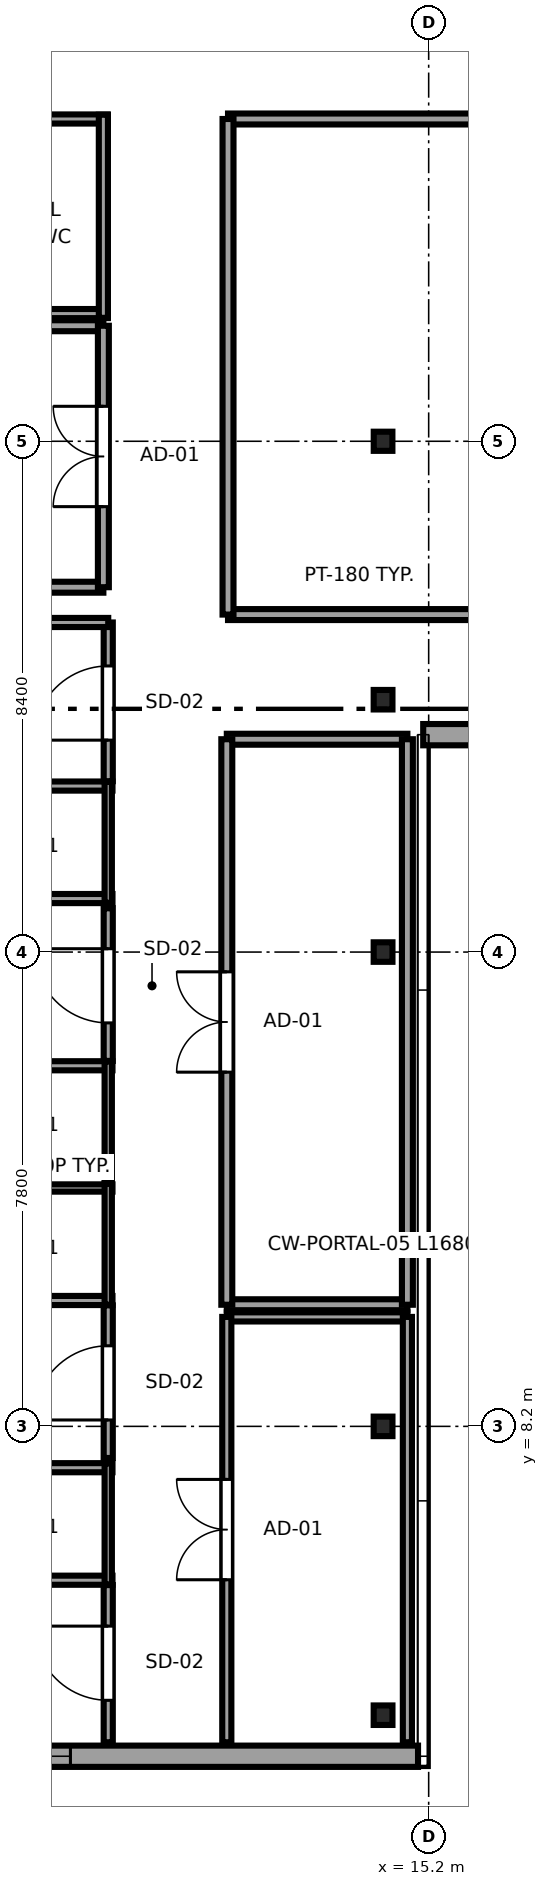
"""IFC4 building model, lengths in metres.
Left out: names, types, materials, properties, quantities, classifications, styles, units other than length and angle.
Written with IfcOpenShell. Run it as: python <this file> out.ifc"""

import sys

from ifc_helpers import new_model, si_unit, direction, frame, frame_2d, origin, origin_2d, place, context, subcontext, project, spatial, rectangle, i_section, extrude, source, transform, mapped, element, fill, save


model = new_model("IFC4")
c1 = context("Model", 3, precision=1e-05, world=origin(), true_north=direction((0.0, 1.0)))
c2 = subcontext(c1, "Body", "Model", "MODEL_VIEW")
j1 = project(units=[si_unit("LENGTHUNIT", "METRE"), si_unit("PLANEANGLEUNIT", "RADIAN")], contexts=[c1])
p1 = place(None, origin())
s1 = spatial("IfcSite", under=j1, at=p1, CompositionType="ELEMENT")
p2 = place(p1, origin())
s2 = spatial("IfcBuilding", under=s1, at=p2, CompositionType="ELEMENT")
p3 = place(p2, frame((0.0, 0.0, 245.2)))
s3 = spatial("IfcBuildingStorey", under=s2, at=p3, CompositionType="ELEMENT", Elevation=245.2)
m1 = source(origin(), c2, "Body", "SweptSolid", [
    extrude(i_section(OverallWidth=0.309, OverallDepth=0.321, WebThickness=0.014, FlangeThickness=0.022, FilletRadius=0.017, at=origin_2d()), origin(), (0.0, 0.0, 1.0), 3.55),
])
for number, where, z_axis, x_axis in (
    (1, (14.45, 3.45, 0.0), (0.0, 0.0, 1.0), (1.0, 0.0, 0.0)),
    (2, (14.45, 8.2, 0.0), (0.0, 0.0, 1.0), (1.0, 0.0, 0.0)),
    (3, (14.45, 16.0, 0.0), (0.0, 0.0, 1.0), (1.0, 0.0, 0.0)),
):
    element("IfcColumn", number, at=place(p3, frame(where, z_axis=z_axis, x_axis=x_axis)), inside=s3, PredefinedType="COLUMN", context=c2, shape_type="MappedRepresentation", body=[
        mapped(m1, transform((0.0, 0.0, 0.0), x_axis=(1.0, 0.0, 0.0), y_axis=(0.0, 1.0, 0.0), z_axis=(0.0, 0.0, 1.0), scale=1.0)),
    ])
m2 = source(origin(), c2, "Body", "SweptSolid", [
    extrude(i_section(OverallWidth=0.307, OverallDepth=0.315, WebThickness=0.012, FlangeThickness=0.019, FilletRadius=0.017, at=origin_2d()), origin(), (0.0, 0.0, 1.0), 3.55),
])
p4 = place(p3, frame((14.45, 24.4, 0.0), z_axis=(0.0, 0.0, 1.0), x_axis=(1.0, 0.0, 0.0)))
e4 = element("IfcColumn", 4, at=p4, inside=s3, PredefinedType="COLUMN", context=c2, shape_type="MappedRepresentation", body=[
    mapped(m2, transform((0.0, 0.0, 0.0), x_axis=(1.0, 0.0, 0.0), y_axis=(0.0, 1.0, 0.0), z_axis=(0.0, 0.0, 1.0), scale=1.0)),
])
p5 = place(p3, frame((14.45, 20.15, 0.0), z_axis=(0.0, 0.0, 1.0), x_axis=(1.0, 0.0, 0.0)))
e5 = element("IfcColumn", 5, at=p5, inside=s3, PredefinedType="COLUMN", context=c2, shape_type="MappedRepresentation", body=[
    mapped(m1, transform((0.0, 0.0, 0.0), x_axis=(1.0, 0.0, 0.0), y_axis=(0.0, 1.0, 0.0), z_axis=(0.0, 0.0, 1.0), scale=1.0)),
])
p6 = place(p3, frame((7.017, 2.775, 0.0), z_axis=(0.0, 0.0, 1.0), x_axis=(1.0, 0.0, 0.0)))
e6 = element("IfcWall", 6, at=p6, inside=s3, PredefinedType="SOLIDWALL", context=c2, shape_type="SweptSolid", body=[
    extrude(rectangle(XDim=8.008, YDim=0.35, at=frame_2d((4.004, 0.0))), origin(), (0.0, 0.0, 1.0), 3.37),
])
p7 = place(p6, frame((0.791, 0.0, 0.62)))
e7 = element("IfcOpeningElement", 7, at=p7, cuts=e6, PredefinedType="OPENING", context=c2, shape_type="SweptSolid", body=[
    extrude(rectangle(XDim=1.5, YDim=1.55, at=frame_2d((0.75, 0.775))), frame((0.0, 0.185, 0.0), z_axis=(0.0, -1.0, 0.0), x_axis=(1.0, 0.0, 0.0)), (0.0, 0.0, 1.0), 0.37),
])
p8 = place(p3, frame((15.11, 19.575, 0.0), z_axis=(0.0, 0.0, 1.0), x_axis=(1.0, 0.0, 0.0)))
e8 = element("IfcWall", 8, at=p8, inside=s3, PredefinedType="SOLIDWALL", context=c2, shape_type="SweptSolid", body=[
    extrude(rectangle(XDim=16.98, YDim=0.35, at=frame_2d((8.49, 0.0))), origin(), (0.0, 0.0, 1.0), 3.37),
])
p9 = place(p8, frame((1.88, 0.0, 0.68)))
e9 = element("IfcOpeningElement", 9, at=p9, cuts=e8, PredefinedType="OPENING", context=c2, shape_type="SweptSolid", body=[
    extrude(rectangle(XDim=2.7, YDim=1.95, at=frame_2d((1.35, 0.975))), frame((0.0, 0.185, 0.0), z_axis=(0.0, -1.0, 0.0), x_axis=(1.0, 0.0, 0.0)), (0.0, 0.0, 1.0), 0.37),
])
p10 = place(p8, frame((7.14, 0.0, 0.68)))
e10 = element("IfcOpeningElement", 10, at=p10, cuts=e8, PredefinedType="OPENING", context=c2, shape_type="SweptSolid", body=[
    extrude(rectangle(XDim=2.7, YDim=1.95, at=frame_2d((1.35, 0.975))), frame((0.0, 0.185, 0.0), z_axis=(0.0, -1.0, 0.0), x_axis=(1.0, 0.0, 0.0)), (0.0, 0.0, 1.0), 0.37),
])
p11 = place(p8, frame((12.4, 0.0, 0.68)))
e11 = element("IfcOpeningElement", 11, at=p11, cuts=e8, PredefinedType="OPENING", context=c2, shape_type="SweptSolid", body=[
    extrude(rectangle(XDim=2.7, YDim=1.95, at=frame_2d((1.35, 0.975))), frame((0.0, 0.185, 0.0), z_axis=(0.0, -1.0, 0.0), x_axis=(1.0, 0.0, 0.0)), (0.0, 0.0, 1.0), 0.37),
])
for number, where, z_axis, x_axis in (
    (12, (7.41, 5.67, 0.0), (0.0, 0.0, 1.0), (1.0, 0.0, 0.0)),
    (13, (7.41, 7.52, 0.0), (0.0, 0.0, 1.0), (1.0, 0.0, 0.0)),
):
    element("IfcWall", number, at=place(p3, frame(where, z_axis=z_axis, x_axis=x_axis)), inside=s3, PredefinedType="PARTITIONING", context=c2, shape_type="SweptSolid", body=[
        extrude(rectangle(XDim=2.59, YDim=0.15, at=frame_2d((1.295, 0.0))), origin(), (0.0, 0.0, 1.0), 3.37),
    ])
p12 = place(p3, frame((9.93, 5.6, 0.0), z_axis=(0.0, 0.0, 1.0), x_axis=(0.0, 1.0, 0.0)))
e14 = element("IfcWall", 14, at=p12, inside=s3, PredefinedType="PLUMBINGWALL", context=c2, shape_type="SweptSolid", body=[
    extrude(rectangle(XDim=1.99, YDim=0.12, at=frame_2d((0.995, 0.0))), origin(), (0.0, 0.0, 1.0), 3.37),
])
p13 = place(p3, frame((7.41, 10.27, 0.0), z_axis=(0.0, 0.0, 1.0), x_axis=(1.0, 0.0, 0.0)))
e15 = element("IfcWall", 15, at=p13, inside=s3, PredefinedType="PARTITIONING", context=c2, shape_type="SweptSolid", body=[
    extrude(rectangle(XDim=2.59, YDim=0.15, at=frame_2d((1.295, 0.0))), origin(), (0.0, 0.0, 1.0), 3.37),
])
p14 = place(p3, frame((7.41, 12.12, 0.0), z_axis=(0.0, 0.0, 1.0), x_axis=(1.0, 0.0, 0.0)))
e16 = element("IfcWall", 16, at=p14, inside=s3, PredefinedType="PLUMBINGWALL", context=c2, shape_type="SweptSolid", body=[
    extrude(rectangle(XDim=2.59, YDim=0.12, at=frame_2d((1.295, 0.0))), origin(), (0.0, 0.0, 1.0), 3.37),
])
p15 = place(p3, frame((9.93, 10.2, 0.0), z_axis=(0.0, 0.0, 1.0), x_axis=(0.0, 1.0, 0.0)))
e17 = element("IfcWall", 17, at=p15, inside=s3, PredefinedType="PLUMBINGWALL", context=c2, shape_type="SweptSolid", body=[
    extrude(rectangle(XDim=1.99, YDim=0.12, at=frame_2d((0.995, 0.0))), origin(), (0.0, 0.0, 1.0), 3.37),
])
p16 = place(p3, frame((7.41, 14.13, 0.0), z_axis=(0.0, 0.0, 1.0), x_axis=(1.0, 0.0, 0.0)))
e18 = element("IfcWall", 18, at=p16, inside=s3, PredefinedType="PARTITIONING", context=c2, shape_type="SweptSolid", body=[
    extrude(rectangle(XDim=2.59, YDim=0.15, at=frame_2d((1.295, 0.0))), origin(), (0.0, 0.0, 1.0), 3.37),
])
p17 = place(p3, frame((9.93, 12.21, 0.0), z_axis=(0.0, 0.0, 1.0), x_axis=(0.0, 1.0, 0.0)))
e19 = element("IfcWall", 19, at=p17, inside=s3, PredefinedType="PLUMBINGWALL", context=c2, shape_type="SweptSolid", body=[
    extrude(rectangle(XDim=1.99, YDim=0.12, at=frame_2d((0.995, 0.0))), origin(), (0.0, 0.0, 1.0), 3.37),
])
p18 = place(p3, frame((3.005, 16.88, 0.0), z_axis=(0.0, 0.0, 1.0), x_axis=(1.0, 0.0, 0.0)))
e20 = element("IfcWall", 20, at=p18, inside=s3, PredefinedType="PARTITIONING", context=c2, shape_type="SweptSolid", body=[
    extrude(rectangle(XDim=6.995, YDim=0.15, at=frame_2d((3.498, 0.0))), origin(), (0.0, 0.0, 1.0), 3.37),
])
p19 = place(p3, frame((7.41, 18.73, 0.0), z_axis=(0.0, 0.0, 1.0), x_axis=(1.0, 0.0, 0.0)))
e21 = element("IfcWall", 21, at=p19, inside=s3, PredefinedType="PARTITIONING", context=c2, shape_type="SweptSolid", body=[
    extrude(rectangle(XDim=2.59, YDim=0.15, at=frame_2d((1.295, 0.0))), origin(), (0.0, 0.0, 1.0), 3.37),
])
p20 = place(p3, frame((9.93, 16.81, 0.0), z_axis=(0.0, 0.0, 1.0), x_axis=(0.0, 1.0, 0.0)))
e22 = element("IfcWall", 22, at=p20, inside=s3, PredefinedType="PLUMBINGWALL", context=c2, shape_type="SweptSolid", body=[
    extrude(rectangle(XDim=1.99, YDim=0.12, at=frame_2d((0.995, 0.0))), origin(), (0.0, 0.0, 1.0), 3.37),
])
p21 = place(p3, frame((9.93, 3.005, 0.0), z_axis=(0.0, 0.0, 1.0), x_axis=(0.0, 1.0, 0.0)))
e23 = element("IfcWall", 23, at=p21, inside=s3, PredefinedType="PARTITIONING", context=c2, shape_type="SweptSolid", body=[
    extrude(rectangle(XDim=2.585, YDim=0.15, at=frame_2d((1.292, 0.0))), origin(), (0.0, 0.0, 1.0), 3.37),
])
p22 = place(p21, frame((0.69, 0.0, 0.0)))
e24 = element("IfcOpeningElement", 24, at=p22, cuts=e23, PredefinedType="OPENING", context=c2, shape_type="SweptSolid", body=[
    extrude(rectangle(XDim=1.22, YDim=2.08, at=frame_2d((0.61, 1.04))), frame((0.0, 0.085, 0.0), z_axis=(0.0, -1.0, 0.0), x_axis=(1.0, 0.0, 0.0)), (0.0, 0.0, 1.0), 0.17),
])
p23 = place(p3, frame((9.93, 7.68, 0.0), z_axis=(0.0, 0.0, 1.0), x_axis=(0.0, 1.0, 0.0)))
e25 = element("IfcWall", 25, at=p23, inside=s3, PredefinedType="PARTITIONING", context=c2, shape_type="SweptSolid", body=[
    extrude(rectangle(XDim=2.51, YDim=0.15, at=frame_2d((1.255, 0.0))), origin(), (0.0, 0.0, 1.0), 3.37),
])
p24 = place(p23, frame((0.625, 0.0, 0.0)))
e26 = element("IfcOpeningElement", 26, at=p24, cuts=e25, PredefinedType="OPENING", context=c2, shape_type="SweptSolid", body=[
    extrude(rectangle(XDim=1.22, YDim=2.08, at=frame_2d((0.61, 1.04))), frame((0.0, 0.085, 0.0), z_axis=(0.0, -1.0, 0.0), x_axis=(1.0, 0.0, 0.0)), (0.0, 0.0, 1.0), 0.17),
])
p25 = place(p3, frame((9.93, 14.21, 0.0), z_axis=(0.0, 0.0, 1.0), x_axis=(0.0, 1.0, 0.0)))
e27 = element("IfcWall", 27, at=p25, inside=s3, PredefinedType="PARTITIONING", context=c2, shape_type="SweptSolid", body=[
    extrude(rectangle(XDim=2.51, YDim=0.15, at=frame_2d((1.255, 0.0))), origin(), (0.0, 0.0, 1.0), 3.37),
])
p26 = place(p25, frame((0.625, 0.0, 0.0)))
e28 = element("IfcOpeningElement", 28, at=p26, cuts=e27, PredefinedType="OPENING", context=c2, shape_type="SweptSolid", body=[
    extrude(rectangle(XDim=1.22, YDim=2.08, at=frame_2d((0.61, 1.04))), frame((0.0, 0.085, 0.0), z_axis=(0.0, -1.0, 0.0), x_axis=(1.0, 0.0, 0.0)), (0.0, 0.0, 1.0), 0.17),
])
p27 = place(p3, frame((9.93, 18.81, 0.0), z_axis=(0.0, 0.0, 1.0), x_axis=(0.0, 1.0, 0.0)))
e29 = element("IfcWall", 29, at=p27, inside=s3, PredefinedType="PARTITIONING", context=c2, shape_type="SweptSolid", body=[
    extrude(rectangle(XDim=2.61, YDim=0.15, at=frame_2d((1.305, 0.0))), origin(), (0.0, 0.0, 1.0), 3.37),
])
p28 = place(p27, frame((0.675, 0.0, 0.0)))
e30 = element("IfcOpeningElement", 30, at=p28, cuts=e29, PredefinedType="OPENING", context=c2, shape_type="SweptSolid", body=[
    extrude(rectangle(XDim=1.22, YDim=2.08, at=frame_2d((0.61, 1.04))), frame((0.0, 0.085, 0.0), z_axis=(0.0, -1.0, 0.0), x_axis=(1.0, 0.0, 0.0)), (0.0, 0.0, 1.0), 0.17),
])
p29 = place(p3, frame((3.005, 21.42, 0.0), z_axis=(0.0, 0.0, 1.0), x_axis=(1.0, 0.0, 0.0)))
e31 = element("IfcWall", 31, at=p29, inside=s3, PredefinedType="PARTITIONING", context=c2, shape_type="SweptSolid", body=[
    extrude(rectangle(XDim=6.925, YDim=0.15, at=frame_2d((3.462, 0.0))), origin(), (0.0, 0.0, 1.0), 3.37),
])
for number, where, z_axis, x_axis in (
    (32, (11.88, 10.2, 0.0), (0.0, 0.0, 1.0), (1.0, 0.0, 0.0)),
    (33, (11.88, 19.5, 0.0), (0.0, 0.0, 1.0), (1.0, 0.0, 0.0)),
):
    element("IfcWall", number, at=place(p3, frame(where, z_axis=z_axis, x_axis=x_axis)), inside=s3, PredefinedType="PARTITIONING", context=c2, shape_type="SweptSolid", body=[
        extrude(rectangle(XDim=2.97, YDim=0.18, at=frame_2d((1.485, 0.0))), origin(), (0.0, 0.0, 1.0), 3.37),
    ])
p30 = place(p3, frame((11.88, 10.2, 0.0), z_axis=(0.0, 0.0, 1.0), x_axis=(0.0, 1.0, 0.0)))
e34 = element("IfcWall", 34, at=p30, inside=s3, PredefinedType="PARTITIONING", context=c2, shape_type="SweptSolid", body=[
    extrude(rectangle(XDim=9.3, YDim=0.18, at=frame_2d((4.65, 0.0))), origin(), (0.0, 0.0, 1.0), 3.37),
])
p31 = place(p30, frame((3.825, 0.0, 0.0)))
e35 = element("IfcOpeningElement", 35, at=p31, cuts=e34, PredefinedType="OPENING", context=c2, shape_type="SweptSolid", body=[
    extrude(rectangle(XDim=1.65, YDim=2.15, at=frame_2d((0.825, 1.075))), frame((0.0, 0.1, 0.0), z_axis=(0.0, -1.0, 0.0), x_axis=(1.0, 0.0, 0.0)), (0.0, 0.0, 1.0), 0.2),
])
p32 = place(p3, frame((14.85, 10.2, 0.0), z_axis=(0.0, 0.0, 1.0), x_axis=(0.0, 1.0, 0.0)))
e36 = element("IfcWall", 36, at=p32, inside=s3, PredefinedType="PARTITIONING", context=c2, shape_type="SweptSolid", body=[
    extrude(rectangle(XDim=9.3, YDim=0.18, at=frame_2d((4.65, 0.0))), origin(), (0.0, 0.0, 1.0), 3.37),
])
p33 = place(p3, frame((11.88, 10.0, 0.0), z_axis=(0.0, 0.0, 1.0), x_axis=(1.0, 0.0, 0.0)))
e37 = element("IfcWall", 37, at=p33, inside=s3, PredefinedType="PARTITIONING", context=c2, shape_type="SweptSolid", body=[
    extrude(rectangle(XDim=2.97, YDim=0.15, at=frame_2d((1.485, 0.0))), origin(), (0.0, 0.0, 1.0), 3.37),
])
p34 = place(p3, frame((11.88, 3.005, 0.0), z_axis=(0.0, 0.0, 1.0), x_axis=(0.0, 1.0, 0.0)))
e38 = element("IfcWall", 38, at=p34, inside=s3, PredefinedType="PARTITIONING", context=c2, shape_type="SweptSolid", body=[
    extrude(rectangle(XDim=6.995, YDim=0.15, at=frame_2d((3.498, 0.0))), origin(), (0.0, 0.0, 1.0), 3.37),
])
p35 = place(p34, frame((2.673, 0.0, 0.0)))
e39 = element("IfcOpeningElement", 39, at=p35, cuts=e38, PredefinedType="OPENING", context=c2, shape_type="SweptSolid", body=[
    extrude(rectangle(XDim=1.65, YDim=2.15, at=frame_2d((0.825, 1.075))), frame((0.0, 0.085, 0.0), z_axis=(0.0, -1.0, 0.0), x_axis=(1.0, 0.0, 0.0)), (0.0, 0.0, 1.0), 0.17),
])
p36 = place(p3, frame((14.85, 3.005, 0.0), z_axis=(0.0, 0.0, 1.0), x_axis=(0.0, 1.0, 0.0)))
e40 = element("IfcWall", 40, at=p36, inside=s3, PredefinedType="PARTITIONING", context=c2, shape_type="SweptSolid", body=[
    extrude(rectangle(XDim=6.995, YDim=0.15, at=frame_2d((3.498, 0.0))), origin(), (0.0, 0.0, 1.0), 3.37),
])
p37 = place(p3, frame((11.9, 21.55, 0.0), z_axis=(0.0, 0.0, 1.0), x_axis=(1.0, 0.0, 0.0)))
e41 = element("IfcWall", 41, at=p37, inside=s3, PredefinedType="PARTITIONING", context=c2, shape_type="SweptSolid", body=[
    extrude(rectangle(XDim=10.3, YDim=0.18, at=frame_2d((5.15, 0.0))), origin(), (0.0, 0.0, 1.0), 3.37),
])
p38 = place(p37, frame((4.325, 0.0, 0.0)))
e42 = element("IfcOpeningElement", 42, at=p38, cuts=e41, PredefinedType="OPENING", context=c2, shape_type="SweptSolid", body=[
    extrude(rectangle(XDim=1.65, YDim=2.15, at=frame_2d((0.825, 1.075))), frame((0.0, 0.1, 0.0), z_axis=(0.0, -1.0, 0.0), x_axis=(1.0, 0.0, 0.0)), (0.0, 0.0, 1.0), 0.2),
])
p39 = place(p3, frame((11.9, 29.7, 0.0), z_axis=(0.0, 0.0, 1.0), x_axis=(1.0, 0.0, 0.0)))
e43 = element("IfcWall", 43, at=p39, inside=s3, PredefinedType="PARTITIONING", context=c2, shape_type="SweptSolid", body=[
    extrude(rectangle(XDim=10.3, YDim=0.18, at=frame_2d((5.15, 0.0))), origin(), (0.0, 0.0, 1.0), 3.37),
])
p40 = place(p3, frame((11.9, 21.55, 0.0), z_axis=(0.0, 0.0, 1.0), x_axis=(0.0, 1.0, 0.0)))
e44 = element("IfcWall", 44, at=p40, inside=s3, PredefinedType="PARTITIONING", context=c2, shape_type="SweptSolid", body=[
    extrude(rectangle(XDim=8.15, YDim=0.18, at=frame_2d((4.075, 0.0))), origin(), (0.0, 0.0, 1.0), 3.37),
])
for number, where, z_axis, x_axis in (
    (45, (3.005, 22.0, 0.0), (0.0, 0.0, 1.0), (1.0, 0.0, 0.0)),
    (46, (3.005, 26.3, 0.0), (0.0, 0.0, 1.0), (1.0, 0.0, 0.0)),
):
    element("IfcWall", number, at=place(p3, frame(where, z_axis=z_axis, x_axis=x_axis)), inside=s3, PredefinedType="PARTITIONING", context=c2, shape_type="SweptSolid", body=[
        extrude(rectangle(XDim=6.845, YDim=0.18, at=frame_2d((3.423, 0.0))), origin(), (0.0, 0.0, 1.0), 3.37),
    ])
p41 = place(p3, frame((9.85, 22.0, 0.0), z_axis=(0.0, 0.0, 1.0), x_axis=(0.0, 1.0, 0.0)))
e47 = element("IfcWall", 47, at=p41, inside=s3, PredefinedType="PARTITIONING", context=c2, shape_type="SweptSolid", body=[
    extrude(rectangle(XDim=4.3, YDim=0.18, at=frame_2d((2.15, 0.0))), origin(), (0.0, 0.0, 1.0), 3.37),
])
p42 = place(p41, frame((1.325, 0.0, 0.0)))
e48 = element("IfcOpeningElement", 48, at=p42, cuts=e47, PredefinedType="OPENING", context=c2, shape_type="SweptSolid", body=[
    extrude(rectangle(XDim=1.65, YDim=2.15, at=frame_2d((0.825, 1.075))), frame((0.0, 0.1, 0.0), z_axis=(0.0, -1.0, 0.0), x_axis=(1.0, 0.0, 0.0)), (0.0, 0.0, 1.0), 0.2),
])
p43 = place(p3, frame((6.13, 26.5, 0.0), z_axis=(0.0, 0.0, 1.0), x_axis=(1.0, 0.0, 0.0)))
e49 = element("IfcWall", 49, at=p43, inside=s3, PredefinedType="PARTITIONING", context=c2, shape_type="SweptSolid", body=[
    extrude(rectangle(XDim=3.79, YDim=0.15, at=frame_2d((1.895, 0.0))), origin(), (0.0, 0.0, 1.0), 3.37),
])
p44 = place(p3, frame((6.13, 29.7, 0.0), z_axis=(0.0, 0.0, 1.0), x_axis=(1.0, 0.0, 0.0)))
e50 = element("IfcWall", 50, at=p44, inside=s3, PredefinedType="PARTITIONING", context=c2, shape_type="SweptSolid", body=[
    extrude(rectangle(XDim=3.79, YDim=0.15, at=frame_2d((1.895, 0.0))), origin(), (0.0, 0.0, 1.0), 3.37),
])
p45 = place(p44, frame((1.435, 0.0, 0.0)))
e51 = element("IfcOpeningElement", 51, at=p45, cuts=e50, PredefinedType="OPENING", context=c2, shape_type="SweptSolid", body=[
    extrude(rectangle(XDim=0.92, YDim=2.01, at=frame_2d((0.46, 1.005))), frame((0.0, 0.085, 0.0), z_axis=(0.0, -1.0, 0.0), x_axis=(1.0, 0.0, 0.0)), (0.0, 0.0, 1.0), 0.17),
])
p46 = place(p3, frame((9.85, 26.43, 0.0), z_axis=(0.0, 0.0, 1.0), x_axis=(0.0, 1.0, 0.0)))
e52 = element("IfcWall", 52, at=p46, inside=s3, PredefinedType="PARTITIONING", context=c2, shape_type="SweptSolid", body=[
    extrude(rectangle(XDim=3.34, YDim=0.15, at=frame_2d((1.67, 0.0))), origin(), (0.0, 0.0, 1.0), 3.37),
])
m3 = source(origin(), c2, "Body", "SweptSolid", [
    extrude(rectangle(XDim=1.5, YDim=1.55, at=frame_2d((0.75, 0.775))), frame((0.0, 0.09, 0.0), z_axis=(0.0, -1.0, 0.0), x_axis=(1.0, 0.0, 0.0)), (0.0, 0.0, 1.0), 0.06),
])
p47 = place(p7, origin())
e53 = element("IfcWindow", 53, at=p47, inside=s3, PartitioningType="SINGLE_PANEL", PredefinedType="WINDOW", context=c2, shape_type="MappedRepresentation", body=[
    mapped(m3, transform((0.0, 0.0, 0.0), x_axis=(1.0, 0.0, 0.0), y_axis=(0.0, 1.0, 0.0), z_axis=(0.0, 0.0, 1.0), scale=1.0)),
])
fill(e7, e53)
m4 = source(origin(), c2, "Body", "SweptSolid", [
    extrude(rectangle(XDim=1.22, YDim=2.08, at=frame_2d((0.61, 1.04))), frame((0.0, 0.025, 0.0), z_axis=(0.0, -1.0, 0.0), x_axis=(1.0, 0.0, 0.0)), (0.0, 0.0, 1.0), 0.05),
])
p48 = place(p22, origin())
e54 = element("IfcDoor", 54, at=p48, inside=s3, OperationType="SINGLE_SWING_RIGHT", PredefinedType="DOOR", context=c2, shape_type="MappedRepresentation", body=[
    mapped(m4, transform((0.0, 0.0, 0.0), x_axis=(1.0, 0.0, 0.0), y_axis=(0.0, 1.0, 0.0), z_axis=(0.0, 0.0, 1.0), scale=1.0)),
])
fill(e24, e54)
p49 = place(p24, origin())
e55 = element("IfcDoor", 55, at=p49, inside=s3, OperationType="SINGLE_SWING_LEFT", PredefinedType="DOOR", context=c2, shape_type="MappedRepresentation", body=[
    mapped(m4, transform((0.0, 0.0, 0.0), x_axis=(1.0, 0.0, 0.0), y_axis=(0.0, 1.0, 0.0), z_axis=(0.0, 0.0, 1.0), scale=1.0)),
])
fill(e26, e55)
p50 = place(p26, origin())
e56 = element("IfcDoor", 56, at=p50, inside=s3, OperationType="SINGLE_SWING_RIGHT", PredefinedType="DOOR", context=c2, shape_type="MappedRepresentation", body=[
    mapped(m4, transform((0.0, 0.0, 0.0), x_axis=(1.0, 0.0, 0.0), y_axis=(0.0, 1.0, 0.0), z_axis=(0.0, 0.0, 1.0), scale=1.0)),
])
fill(e28, e56)
p51 = place(p28, origin())
e57 = element("IfcDoor", 57, at=p51, inside=s3, OperationType="SINGLE_SWING_LEFT", PredefinedType="DOOR", context=c2, shape_type="MappedRepresentation", body=[
    mapped(m4, transform((0.0, 0.0, 0.0), x_axis=(1.0, 0.0, 0.0), y_axis=(0.0, 1.0, 0.0), z_axis=(0.0, 0.0, 1.0), scale=1.0)),
])
fill(e30, e57)
m5 = source(origin(), c2, "Body", "SweptSolid", [
    extrude(rectangle(XDim=1.65, YDim=2.15, at=frame_2d((0.825, 1.075))), frame((0.0, 0.025, 0.0), z_axis=(0.0, -1.0, 0.0), x_axis=(1.0, 0.0, 0.0)), (0.0, 0.0, 1.0), 0.05),
])
p52 = place(p31, origin())
e58 = element("IfcDoor", 58, at=p52, inside=s3, OperationType="DOUBLE_DOOR_SINGLE_SWING", PredefinedType="DOOR", context=c2, shape_type="MappedRepresentation", body=[
    mapped(m5, transform((0.0, 0.0, 0.0), x_axis=(1.0, 0.0, 0.0), y_axis=(0.0, 1.0, 0.0), z_axis=(0.0, 0.0, 1.0), scale=1.0)),
])
fill(e35, e58)
p53 = place(p35, origin())
e59 = element("IfcDoor", 59, at=p53, inside=s3, OperationType="DOUBLE_DOOR_SINGLE_SWING", PredefinedType="DOOR", context=c2, shape_type="MappedRepresentation", body=[
    mapped(m5, transform((0.0, 0.0, 0.0), x_axis=(1.0, 0.0, 0.0), y_axis=(0.0, 1.0, 0.0), z_axis=(0.0, 0.0, 1.0), scale=1.0)),
])
fill(e39, e59)
p54 = place(p42, origin())
e60 = element("IfcDoor", 60, at=p54, inside=s3, OperationType="DOUBLE_DOOR_SINGLE_SWING", PredefinedType="DOOR", context=c2, shape_type="MappedRepresentation", body=[
    mapped(m5, transform((0.0, 0.0, 0.0), x_axis=(1.0, 0.0, 0.0), y_axis=(0.0, 1.0, 0.0), z_axis=(0.0, 0.0, 1.0), scale=1.0)),
])
fill(e48, e60)
save(model, sys.argv[1])
